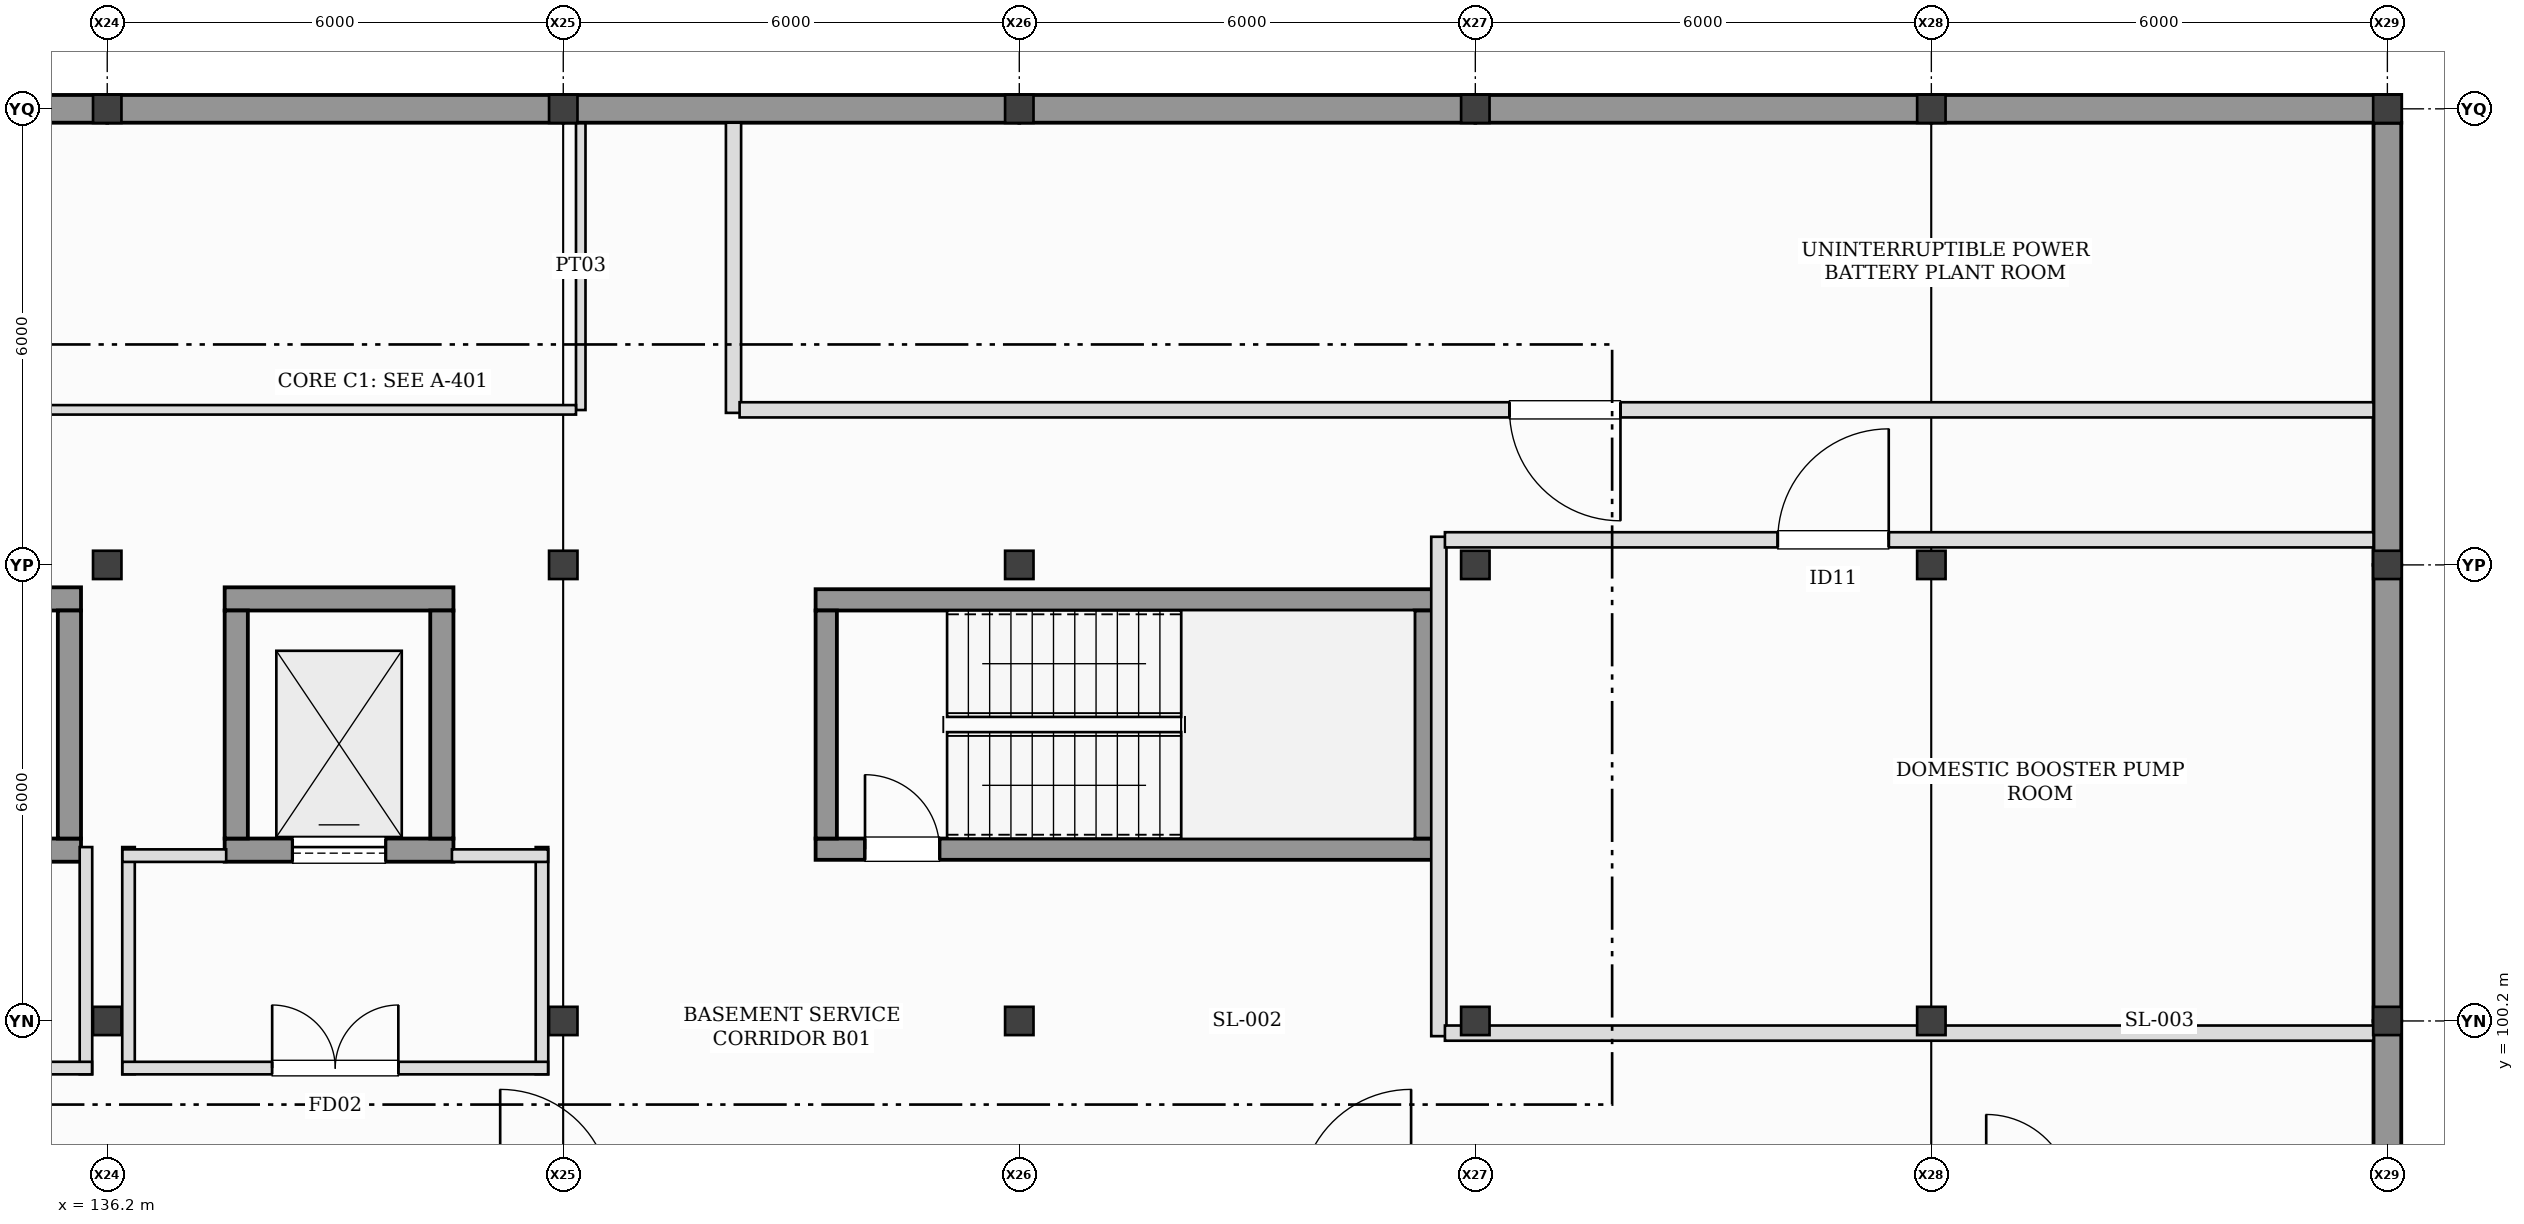
"""IFC4 building model, lengths in metres.
Left out: names, types, materials, properties, quantities, classifications, styles, units other than length and angle.
Written with IfcOpenShell. Run it as: python <this file> out.ifc"""

import sys

from ifc_helpers import new_model, si_unit, direction, frame, frame_2d, origin, origin_2d, place, context, subcontext, project, spatial, rectangle, i_section, extrude, element, fill, save


model = new_model("IFC4")
c1 = context("Model", 3, precision=1e-05, world=origin(), true_north=direction((0.0, 1.0)))
c2 = subcontext(c1, "Body", "Model", "MODEL_VIEW")
j1 = project(units=[si_unit("LENGTHUNIT", "METRE"), si_unit("PLANEANGLEUNIT", "RADIAN")], contexts=[c1])
p1 = place(None, origin())
s1 = spatial("IfcSite", under=j1, at=p1, CompositionType="ELEMENT")
p2 = place(p1, origin())
s2 = spatial("IfcBuilding", under=s1, at=p2, CompositionType="ELEMENT")
p3 = place(p2, frame((0.0, 0.0, -4.2)))
s3 = spatial("IfcBuildingStorey", under=s2, at=p3, CompositionType="ELEMENT", Elevation=-4.2)
for number, where, z_axis, x_axis in (
    (1, (136.2, 100.2, -0.45), (0.0, 0.0, 1.0), (1.0, 0.0, 0.0)),
    (2, (136.2, 106.2, -0.45), (0.0, 0.0, 1.0), (1.0, 0.0, 0.0)),
    (3, (136.2, 112.2, -0.45), (0.0, 0.0, 1.0), (1.0, 0.0, 0.0)),
    (4, (142.2, 100.2, -0.45), (0.0, 0.0, 1.0), (1.0, 0.0, 0.0)),
    (5, (142.2, 106.2, -0.45), (0.0, 0.0, 1.0), (1.0, 0.0, 0.0)),
    (6, (142.2, 112.2, -0.45), (0.0, 0.0, 1.0), (1.0, 0.0, 0.0)),
    (7, (148.2, 100.2, -0.45), (0.0, 0.0, 1.0), (1.0, 0.0, 0.0)),
    (8, (148.2, 106.2, -0.45), (0.0, 0.0, 1.0), (1.0, 0.0, 0.0)),
    (9, (148.2, 112.2, -0.45), (0.0, 0.0, 1.0), (1.0, 0.0, 0.0)),
    (10, (154.2, 100.2, -0.45), (0.0, 0.0, 1.0), (1.0, 0.0, 0.0)),
    (11, (154.2, 106.2, -0.45), (0.0, 0.0, 1.0), (1.0, 0.0, 0.0)),
    (12, (154.2, 112.2, -0.45), (0.0, 0.0, 1.0), (1.0, 0.0, 0.0)),
    (13, (160.2, 100.2, -0.45), (0.0, 0.0, 1.0), (1.0, 0.0, 0.0)),
    (14, (160.2, 106.2, -0.45), (0.0, 0.0, 1.0), (1.0, 0.0, 0.0)),
    (15, (160.2, 112.2, -0.45), (0.0, 0.0, 1.0), (1.0, 0.0, 0.0)),
    (16, (166.2, 100.2, -0.45), (0.0, 0.0, 1.0), (1.0, 0.0, 0.0)),
    (17, (166.2, 106.2, -0.45), (0.0, 0.0, 1.0), (1.0, 0.0, 0.0)),
    (18, (166.2, 112.2, -0.45), (0.0, 0.0, 1.0), (1.0, 0.0, 0.0)),
):
    element("IfcColumn", number, at=place(p3, frame(where, z_axis=z_axis, x_axis=x_axis)), inside=s3, PredefinedType="COLUMN", context=c2, shape_type="SweptSolid", body=[
        extrude(i_section(OverallWidth=0.374, OverallDepth=0.372, WebThickness=0.016, FlangeThickness=0.026, at=origin_2d()), origin(), (0.0, 0.0, 1.0), 4.65),
    ])
for number, where, z_axis, x_axis in (
    (19, (136.199, 112.2, 0.0), (0.0, 0.0, 1.0), (-1.0, 0.0, 0.0)),
    (20, (142.199, 112.2, 0.0), (0.0, 0.0, 1.0), (-1.0, 0.0, 0.0)),
    (21, (148.199, 112.2, 0.0), (0.0, 0.0, 1.0), (-1.0, 0.0, 0.0)),
    (22, (154.199, 112.2, 0.0), (0.0, 0.0, 1.0), (-1.0, 0.0, 0.0)),
    (23, (160.199, 112.2, 0.0), (0.0, 0.0, 1.0), (-1.0, 0.0, 0.0)),
):
    element("IfcWall", number, at=place(p3, frame(where, z_axis=z_axis, x_axis=x_axis)), inside=s3, PredefinedType="SHEAR", context=c2, shape_type="SweptSolid", body=[
        extrude(rectangle(XDim=5.998, YDim=0.365, at=frame_2d((2.999, 0.0))), origin(), (0.0, 0.0, 1.0), 3.85),
    ])
p4 = place(p3, frame((166.383, 112.2, 0.0), z_axis=(0.0, 0.0, 1.0), x_axis=(-1.0, 0.0, 0.0)))
e24 = element("IfcWall", 24, at=p4, inside=s3, PredefinedType="SHEAR", context=c2, shape_type="SweptSolid", body=[
    extrude(rectangle(XDim=6.182, YDim=0.365, at=frame_2d((3.091, 0.0))), origin(), (0.0, 0.0, 1.0), 3.85),
])
for number, where, z_axis, x_axis in (
    (25, (166.2, 94.201, 0.0), (0.0, 0.0, 1.0), (0.0, 1.0, 0.0)),
    (26, (166.2, 100.201, 0.0), (0.0, 0.0, 1.0), (0.0, 1.0, 0.0)),
):
    element("IfcWall", number, at=place(p3, frame(where, z_axis=z_axis, x_axis=x_axis)), inside=s3, PredefinedType="SHEAR", context=c2, shape_type="SweptSolid", body=[
        extrude(rectangle(XDim=5.998, YDim=0.365, at=frame_2d((2.999, 0.0))), origin(), (0.0, 0.0, 1.0), 3.85),
    ])
p5 = place(p3, frame((166.2, 106.201, 0.0), z_axis=(0.0, 0.0, 1.0), x_axis=(0.0, 1.0, 0.0)))
e27 = element("IfcWall", 27, at=p5, inside=s3, PredefinedType="SHEAR", context=c2, shape_type="SweptSolid", body=[
    extrude(rectangle(XDim=5.814, YDim=0.365, at=frame_2d((2.907, 0.0))), origin(), (0.0, 0.0, 1.0), 3.85),
])
p6 = place(p3, frame((145.52, 102.46, 0.0), z_axis=(0.0, 0.0, 1.0), x_axis=(1.0, 0.0, 0.0)))
e28 = element("IfcWall", 28, at=p6, inside=s3, PredefinedType="SHEAR", context=c2, shape_type="SweptSolid", body=[
    extrude(rectangle(XDim=8.16, YDim=0.28, at=frame_2d((4.08, 0.0))), origin(), (0.0, 0.0, 1.0), 4.2),
])
p7 = place(p6, frame((0.65, 0.0, 0.0)))
e29 = element("IfcOpeningElement", 29, at=p7, cuts=e28, PredefinedType="OPENING", context=c2, shape_type="SweptSolid", body=[
    extrude(rectangle(XDim=0.98, YDim=2.15, at=frame_2d((0.49, 1.075))), frame((0.0, 0.15, 0.0), z_axis=(0.0, -1.0, 0.0), x_axis=(1.0, 0.0, 0.0)), (0.0, 0.0, 1.0), 0.3),
])
p8 = place(p3, frame((153.68, 105.74, 0.0), z_axis=(0.0, 0.0, 1.0), x_axis=(-1.0, 0.0, 0.0)))
e30 = element("IfcWall", 30, at=p8, inside=s3, PredefinedType="SHEAR", context=c2, shape_type="SweptSolid", body=[
    extrude(rectangle(XDim=8.16, YDim=0.28, at=frame_2d((4.08, 0.0))), origin(), (0.0, 0.0, 1.0), 4.2),
])
for number, where, z_axis, x_axis in (
    (31, (145.66, 105.6, 0.0), (0.0, 0.0, 1.0), (0.0, -1.0, 0.0)),
    (32, (153.54, 102.6, 0.0), (0.0, 0.0, 1.0), (0.0, 1.0, 0.0)),
):
    element("IfcWall", number, at=place(p3, frame(where, z_axis=z_axis, x_axis=x_axis)), inside=s3, PredefinedType="SHEAR", context=c2, shape_type="SweptSolid", body=[
        extrude(rectangle(XDim=3.0, YDim=0.28, at=frame_2d((1.5, 0.0))), origin(), (0.0, 0.0, 1.0), 4.2),
    ])
p9 = place(p3, frame((132.845, 102.448, 0.0), z_axis=(0.0, 0.0, 1.0), x_axis=(1.0, 0.0, 0.0)))
e33 = element("IfcWall", 33, at=p9, inside=s3, PredefinedType="SHEAR", context=c2, shape_type="SweptSolid", body=[
    extrude(rectangle(XDim=3.01, YDim=0.305, at=frame_2d((1.505, 0.0))), origin(), (0.0, 0.0, 1.0), 4.2),
])
p10 = place(p9, frame((0.895, 0.0, 0.0)))
e34 = element("IfcOpeningElement", 34, at=p10, cuts=e33, PredefinedType="OPENING", context=c2, shape_type="SweptSolid", body=[
    extrude(rectangle(XDim=1.22, YDim=2.22, at=frame_2d((0.61, 1.11))), frame((0.0, 0.162, 0.0), z_axis=(0.0, -1.0, 0.0), x_axis=(1.0, 0.0, 0.0)), (0.0, 0.0, 1.0), 0.325),
])
p11 = place(p3, frame((135.855, 105.752, 0.0), z_axis=(0.0, 0.0, 1.0), x_axis=(-1.0, 0.0, 0.0)))
e35 = element("IfcWall", 35, at=p11, inside=s3, PredefinedType="SHEAR", context=c2, shape_type="SweptSolid", body=[
    extrude(rectangle(XDim=3.01, YDim=0.305, at=frame_2d((1.505, 0.0))), origin(), (0.0, 0.0, 1.0), 4.2),
])
p12 = place(p3, frame((135.702, 102.6, 0.0), z_axis=(0.0, 0.0, 1.0), x_axis=(0.0, 1.0, 0.0)))
e36 = element("IfcWall", 36, at=p12, inside=s3, PredefinedType="SHEAR", context=c2, shape_type="SweptSolid", body=[
    extrude(rectangle(XDim=3.0, YDim=0.305, at=frame_2d((1.5, 0.0))), origin(), (0.0, 0.0, 1.0), 4.2),
])
p13 = place(p3, frame((135.92, 102.488, 0.0), z_axis=(0.0, 0.0, 1.0), x_axis=(0.0, -1.0, 0.0)))
e37 = element("IfcWall", 37, at=p13, inside=s3, PredefinedType="PARTITIONING", context=c2, shape_type="SweptSolid", body=[
    extrude(rectangle(XDim=2.988, YDim=0.165, at=frame_2d((1.494, 0.0))), origin(), (0.0, 0.0, 1.0), 3.79),
])
p14 = place(p3, frame((130.4, 99.58, 0.0), z_axis=(0.0, 0.0, 1.0), x_axis=(1.0, 0.0, 0.0)))
e38 = element("IfcWall", 38, at=p14, inside=s3, PredefinedType="PARTITIONING", context=c2, shape_type="SweptSolid", body=[
    extrude(rectangle(XDim=5.6, YDim=0.165, at=frame_2d((2.8, 0.0))), origin(), (0.0, 0.0, 1.0), 3.79),
])
p15 = place(p14, frame((1.97, 0.0, 0.0)))
e39 = element("IfcOpeningElement", 39, at=p15, cuts=e38, PredefinedType="OPENING", context=c2, shape_type="SweptSolid", body=[
    extrude(rectangle(XDim=1.66, YDim=2.2, at=frame_2d((0.83, 1.1))), frame((0.0, 0.093, 0.0), z_axis=(0.0, -1.0, 0.0), x_axis=(1.0, 0.0, 0.0)), (0.0, 0.0, 1.0), 0.185),
])
p16 = place(p3, frame((137.745, 102.448, 0.0), z_axis=(0.0, 0.0, 1.0), x_axis=(1.0, 0.0, 0.0)))
e40 = element("IfcWall", 40, at=p16, inside=s3, PredefinedType="SHEAR", context=c2, shape_type="SweptSolid", body=[
    extrude(rectangle(XDim=3.01, YDim=0.305, at=frame_2d((1.505, 0.0))), origin(), (0.0, 0.0, 1.0), 4.2),
])
p17 = place(p16, frame((0.895, 0.0, 0.0)))
e41 = element("IfcOpeningElement", 41, at=p17, cuts=e40, PredefinedType="OPENING", context=c2, shape_type="SweptSolid", body=[
    extrude(rectangle(XDim=1.22, YDim=2.22, at=frame_2d((0.61, 1.11))), frame((0.0, 0.162, 0.0), z_axis=(0.0, -1.0, 0.0), x_axis=(1.0, 0.0, 0.0)), (0.0, 0.0, 1.0), 0.325),
])
p18 = place(p3, frame((140.755, 105.752, 0.0), z_axis=(0.0, 0.0, 1.0), x_axis=(-1.0, 0.0, 0.0)))
e42 = element("IfcWall", 42, at=p18, inside=s3, PredefinedType="SHEAR", context=c2, shape_type="SweptSolid", body=[
    extrude(rectangle(XDim=3.01, YDim=0.305, at=frame_2d((1.505, 0.0))), origin(), (0.0, 0.0, 1.0), 4.2),
])
for number, where, z_axis, x_axis in (
    (43, (137.897, 105.6, 0.0), (0.0, 0.0, 1.0), (0.0, -1.0, 0.0)),
    (44, (140.603, 102.6, 0.0), (0.0, 0.0, 1.0), (0.0, 1.0, 0.0)),
):
    element("IfcWall", number, at=place(p3, frame(where, z_axis=z_axis, x_axis=x_axis)), inside=s3, PredefinedType="SHEAR", context=c2, shape_type="SweptSolid", body=[
        extrude(rectangle(XDim=3.0, YDim=0.305, at=frame_2d((1.5, 0.0))), origin(), (0.0, 0.0, 1.0), 4.2),
    ])
for number, where, z_axis, x_axis in (
    (45, (136.48, 99.5, 0.0), (0.0, 0.0, 1.0), (0.0, 1.0, 0.0)),
    (46, (141.92, 102.488, 0.0), (0.0, 0.0, 1.0), (0.0, -1.0, 0.0)),
):
    element("IfcWall", number, at=place(p3, frame(where, z_axis=z_axis, x_axis=x_axis)), inside=s3, PredefinedType="PARTITIONING", context=c2, shape_type="SweptSolid", body=[
        extrude(rectangle(XDim=2.988, YDim=0.165, at=frame_2d((1.494, 0.0))), origin(), (0.0, 0.0, 1.0), 3.79),
    ])
p19 = place(p3, frame((136.4, 102.375, 0.0), z_axis=(0.0, 0.0, 1.0), x_axis=(1.0, 0.0, 0.0)))
e47 = element("IfcWall", 47, at=p19, inside=s3, PredefinedType="PARTITIONING", context=c2, shape_type="SweptSolid", body=[
    extrude(rectangle(XDim=1.365, YDim=0.165, at=frame_2d((0.683, 0.0))), origin(), (0.0, 0.0, 1.0), 3.79),
])
p20 = place(p3, frame((140.735, 102.375, 0.0), z_axis=(0.0, 0.0, 1.0), x_axis=(1.0, 0.0, 0.0)))
e48 = element("IfcWall", 48, at=p20, inside=s3, PredefinedType="PARTITIONING", context=c2, shape_type="SweptSolid", body=[
    extrude(rectangle(XDim=1.265, YDim=0.165, at=frame_2d((0.632, 0.0))), origin(), (0.0, 0.0, 1.0), 3.79),
])
p21 = place(p3, frame((136.4, 99.58, 0.0), z_axis=(0.0, 0.0, 1.0), x_axis=(1.0, 0.0, 0.0)))
e49 = element("IfcWall", 49, at=p21, inside=s3, PredefinedType="PARTITIONING", context=c2, shape_type="SweptSolid", body=[
    extrude(rectangle(XDim=5.6, YDim=0.165, at=frame_2d((2.8, 0.0))), origin(), (0.0, 0.0, 1.0), 3.79),
])
p22 = place(p21, frame((1.97, 0.0, 0.0)))
e50 = element("IfcOpeningElement", 50, at=p22, cuts=e49, PredefinedType="OPENING", context=c2, shape_type="SweptSolid", body=[
    extrude(rectangle(XDim=1.66, YDim=2.2, at=frame_2d((0.83, 1.1))), frame((0.0, 0.093, 0.0), z_axis=(0.0, -1.0, 0.0), x_axis=(1.0, 0.0, 0.0)), (0.0, 0.0, 1.0), 0.185),
])
p23 = place(p3, frame((142.43, 112.018, 0.0), z_axis=(0.0, 0.0, 1.0), x_axis=(0.0, -1.0, 0.0)))
e51 = element("IfcWall", 51, at=p23, inside=s3, PredefinedType="PARTITIONING", context=c2, shape_type="SweptSolid", body=[
    extrude(rectangle(XDim=3.78, YDim=0.125, at=frame_2d((1.89, 0.0))), origin(), (0.0, 0.0, 1.0), 3.79),
])
p24 = place(p3, frame((142.367, 108.24, 0.0), z_axis=(0.0, 0.0, 1.0), x_axis=(-1.0, 0.0, 0.0)))
e52 = element("IfcWall", 52, at=p24, inside=s3, PredefinedType="PARTITIONING", context=c2, shape_type="SweptSolid", body=[
    extrude(rectangle(XDim=17.985, YDim=0.125, at=frame_2d((8.992, 0.0))), origin(), (0.0, 0.0, 1.0), 3.79),
])
p25 = place(p24, frame((8.302, 0.0, 0.0)))
e53 = element("IfcOpeningElement", 53, at=p25, cuts=e52, PredefinedType="OPENING", context=c2, shape_type="SweptSolid", body=[
    extrude(rectangle(XDim=1.16, YDim=2.2, at=frame_2d((0.58, 1.1))), frame((0.0, 0.073, 0.0), z_axis=(0.0, -1.0, 0.0), x_axis=(1.0, 0.0, 0.0)), (0.0, 0.0, 1.0), 0.145),
])
p26 = place(p3, frame((144.44, 108.2, 0.0), z_axis=(0.0, 0.0, 1.0), x_axis=(0.0, 1.0, 0.0)))
e54 = element("IfcWall", 54, at=p26, inside=s3, PredefinedType="PARTITIONING", context=c2, shape_type="SweptSolid", body=[
    extrude(rectangle(XDim=3.818, YDim=0.2, at=frame_2d((1.909, 0.0))), origin(), (0.0, 0.0, 1.0), 3.79),
])
p27 = place(p3, frame((166.018, 108.24, 0.0), z_axis=(0.0, 0.0, 1.0), x_axis=(-1.0, 0.0, 0.0)))
e55 = element("IfcWall", 55, at=p27, inside=s3, PredefinedType="PARTITIONING", context=c2, shape_type="SweptSolid", body=[
    extrude(rectangle(XDim=21.498, YDim=0.2, at=frame_2d((10.749, 0.0))), origin(), (0.0, 0.0, 1.0), 3.79),
])
p28 = place(p27, frame((9.908, 0.0, 0.0)))
e56 = element("IfcOpeningElement", 56, at=p28, cuts=e55, PredefinedType="OPENING", context=c2, shape_type="SweptSolid", body=[
    extrude(rectangle(XDim=1.46, YDim=2.3, at=frame_2d((0.73, 1.15))), frame((0.0, 0.11, 0.0), z_axis=(0.0, -1.0, 0.0), x_axis=(1.0, 0.0, 0.0)), (0.0, 0.0, 1.0), 0.22),
])
p29 = place(p3, frame((153.72, 100.0, 0.0), z_axis=(0.0, 0.0, 1.0), x_axis=(0.0, 1.0, 0.0)))
e57 = element("IfcWall", 57, at=p29, inside=s3, PredefinedType="PARTITIONING", context=c2, shape_type="SweptSolid", body=[
    extrude(rectangle(XDim=6.57, YDim=0.2, at=frame_2d((3.285, 0.0))), origin(), (0.0, 0.0, 1.0), 3.79),
])
p30 = place(p3, frame((153.8, 106.53, 0.0), z_axis=(0.0, 0.0, 1.0), x_axis=(1.0, 0.0, 0.0)))
e58 = element("IfcWall", 58, at=p30, inside=s3, PredefinedType="PARTITIONING", context=c2, shape_type="SweptSolid", body=[
    extrude(rectangle(XDim=12.218, YDim=0.2, at=frame_2d((6.109, 0.0))), origin(), (0.0, 0.0, 1.0), 3.79),
])
p31 = place(p30, frame((4.379, 0.0, 0.0)))
e59 = element("IfcOpeningElement", 59, at=p31, cuts=e58, PredefinedType="OPENING", context=c2, shape_type="SweptSolid", body=[
    extrude(rectangle(XDim=1.46, YDim=2.3, at=frame_2d((0.73, 1.15))), frame((0.0, 0.11, 0.0), z_axis=(0.0, -1.0, 0.0), x_axis=(1.0, 0.0, 0.0)), (0.0, 0.0, 1.0), 0.22),
])
p32 = place(p3, frame((166.018, 100.04, 0.0), z_axis=(0.0, 0.0, 1.0), x_axis=(-1.0, 0.0, 0.0)))
e60 = element("IfcWall", 60, at=p32, inside=s3, PredefinedType="PARTITIONING", context=c2, shape_type="SweptSolid", body=[
    extrude(rectangle(XDim=12.218, YDim=0.2, at=frame_2d((6.109, 0.0))), origin(), (0.0, 0.0, 1.0), 3.79),
])
p33 = place(p7, origin())
e61 = element("IfcDoor", 61, at=p33, inside=s3, OperationType="SINGLE_SWING_LEFT", PredefinedType="DOOR", context=c2, shape_type="SweptSolid", body=[
    extrude(rectangle(XDim=0.98, YDim=2.15, at=frame_2d((0.49, 1.075))), frame((0.0, 0.025, 0.0), z_axis=(0.0, -1.0, 0.0), x_axis=(1.0, 0.0, 0.0)), (0.0, 0.0, 1.0), 0.05),
])
fill(e29, e61)
p34 = place(p17, origin())
e62 = element("IfcDoor", 62, at=p34, inside=s3, OperationType="SLIDING_TO_LEFT", PredefinedType="DOOR", context=c2, shape_type="SweptSolid", body=[
    extrude(rectangle(XDim=1.22, YDim=2.22, at=frame_2d((0.61, 1.11))), frame((0.0, 0.025, 0.0), z_axis=(0.0, -1.0, 0.0), x_axis=(1.0, 0.0, 0.0)), (0.0, 0.0, 1.0), 0.05),
])
fill(e41, e62)
p35 = place(p22, frame((1.66, 0.0, 0.0), z_axis=(0.0, 0.0, 1.0), x_axis=(-1.0, 0.0, 0.0)))
e63 = element("IfcDoor", 63, at=p35, inside=s3, OperationType="DOUBLE_DOOR_SINGLE_SWING", PredefinedType="DOOR", context=c2, shape_type="SweptSolid", body=[
    extrude(rectangle(XDim=1.66, YDim=2.2, at=frame_2d((0.83, 1.1))), frame((0.0, 0.025, 0.0), z_axis=(0.0, -1.0, 0.0), x_axis=(1.0, 0.0, 0.0)), (0.0, 0.0, 1.0), 0.05),
])
fill(e50, e63)
p36 = place(p28, frame((1.46, 0.0, 0.0), z_axis=(0.0, 0.0, 1.0), x_axis=(-1.0, 0.0, 0.0)))
e64 = element("IfcDoor", 64, at=p36, inside=s3, OperationType="SINGLE_SWING_LEFT", PredefinedType="DOOR", context=c2, shape_type="SweptSolid", body=[
    extrude(rectangle(XDim=1.46, YDim=2.3, at=frame_2d((0.73, 1.15))), frame((0.0, 0.025, 0.0), z_axis=(0.0, -1.0, 0.0), x_axis=(1.0, 0.0, 0.0)), (0.0, 0.0, 1.0), 0.05),
])
fill(e56, e64)
p37 = place(p31, frame((1.46, 0.0, 0.0), z_axis=(0.0, 0.0, 1.0), x_axis=(-1.0, 0.0, 0.0)))
e65 = element("IfcDoor", 65, at=p37, inside=s3, OperationType="SINGLE_SWING_RIGHT", PredefinedType="DOOR", context=c2, shape_type="SweptSolid", body=[
    extrude(rectangle(XDim=1.46, YDim=2.3, at=frame_2d((0.73, 1.15))), frame((0.0, 0.025, 0.0), z_axis=(0.0, -1.0, 0.0), x_axis=(1.0, 0.0, 0.0)), (0.0, 0.0, 1.0), 0.05),
])
fill(e59, e65)
save(model, sys.argv[1])
